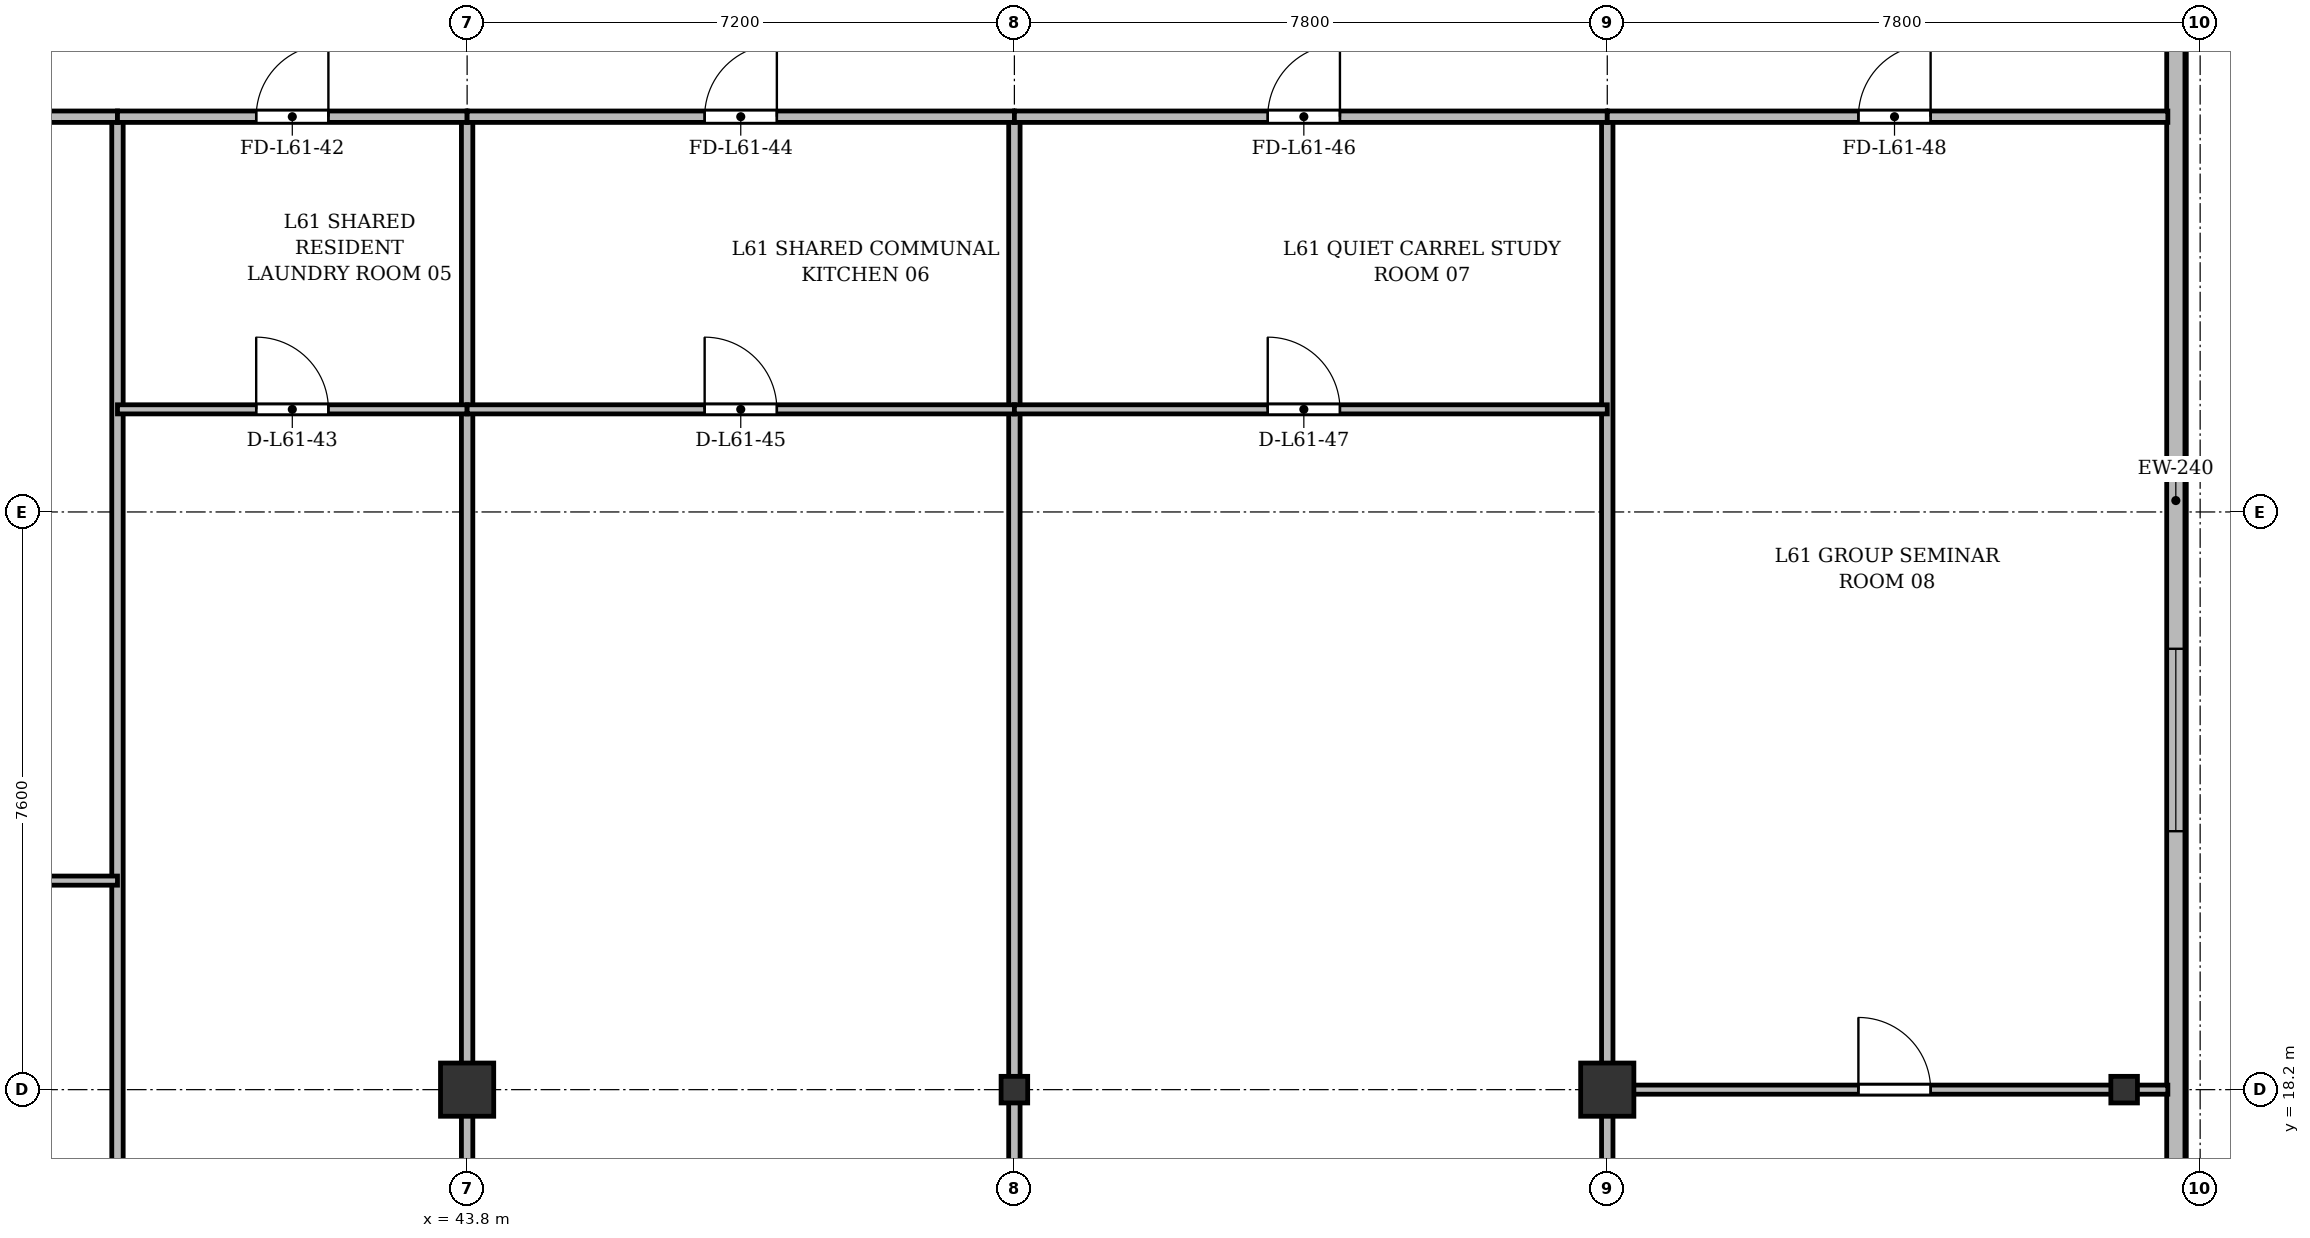
"""IFC4 building model, lengths in metres.
Left out: names, types, materials, properties, quantities, classifications, styles, units other than length and angle.
Written with IfcOpenShell. Run it as: python <this file> out.ifc"""

import sys

from ifc_helpers import new_model, si_unit, direction, frame, frame_2d, origin, origin_2d, place, context, subcontext, project, spatial, rectangle, i_section, extrude, source, transform, mapped, element, fill, save


model = new_model("IFC4")
c1 = context("Model", 3, precision=1e-05, world=origin(), true_north=direction((0.0, 1.0)))
c2 = subcontext(c1, "Body", "Model", "MODEL_VIEW")
j1 = project(units=[si_unit("LENGTHUNIT", "METRE"), si_unit("PLANEANGLEUNIT", "RADIAN")], contexts=[c1])
p1 = place(None, origin())
s1 = spatial("IfcSite", under=j1, at=p1, CompositionType="ELEMENT")
p2 = place(p1, origin())
s2 = spatial("IfcBuilding", under=s1, at=p2, CompositionType="ELEMENT")
p3 = place(p2, frame((0.0, 0.0, 233.7)))
s3 = spatial("IfcBuildingStorey", under=s2, at=p3, CompositionType="ELEMENT", Elevation=233.7)
m1 = source(origin(), c2, "Body", "SweptSolid", [
    extrude(rectangle(XDim=0.7, YDim=0.7, at=origin_2d()), origin(), (0.0, 0.0, 1.0), 3.6),
])
p4 = place(p3, frame((43.8, 18.2, 0.0), z_axis=(0.0, 0.0, 1.0), x_axis=(1.0, 0.0, 0.0)))
e1 = element("IfcColumn", 1, at=p4, inside=s3, PredefinedType="COLUMN", context=c2, shape_type="MappedRepresentation", body=[
    mapped(m1, transform((0.0, 0.0, 0.0), x_axis=(1.0, 0.0, 0.0), y_axis=(0.0, 1.0, 0.0), z_axis=(0.0, 0.0, 1.0), scale=1.0)),
])
m2 = source(origin(), c2, "Body", "SweptSolid", [
    extrude(i_section(OverallWidth=0.35, OverallDepth=0.35, WebThickness=0.018, FlangeThickness=0.028, at=origin_2d()), origin(), (0.0, 0.0, 1.0), 3.6),
])
p5 = place(p3, frame((51.0, 18.2, 0.0), z_axis=(0.0, 0.0, 1.0), x_axis=(1.0, 0.0, 0.0)))
e2 = element("IfcColumn", 2, at=p5, inside=s3, PredefinedType="COLUMN", context=c2, shape_type="MappedRepresentation", body=[
    mapped(m2, transform((0.0, 0.0, 0.0), x_axis=(1.0, 0.0, 0.0), y_axis=(0.0, 1.0, 0.0), z_axis=(0.0, 0.0, 1.0), scale=1.0)),
])
p6 = place(p3, frame((58.8, 18.2, 0.0), z_axis=(0.0, 0.0, 1.0), x_axis=(1.0, 0.0, 0.0)))
e3 = element("IfcColumn", 3, at=p6, inside=s3, PredefinedType="COLUMN", context=c2, shape_type="MappedRepresentation", body=[
    mapped(m1, transform((0.0, 0.0, 0.0), x_axis=(1.0, 0.0, 0.0), y_axis=(0.0, 1.0, 0.0), z_axis=(0.0, 0.0, 1.0), scale=1.0)),
])
p7 = place(p3, frame((65.6, 18.2, 0.0), z_axis=(0.0, 0.0, 1.0), x_axis=(1.0, 0.0, 0.0)))
e4 = element("IfcColumn", 4, at=p7, inside=s3, PredefinedType="COLUMN", context=c2, shape_type="MappedRepresentation", body=[
    mapped(m2, transform((0.0, 0.0, 0.0), x_axis=(1.0, 0.0, 0.0), y_axis=(0.0, 1.0, 0.0), z_axis=(0.0, 0.0, 1.0), scale=1.0)),
])
p8 = place(p3, frame((66.28, 45.5, 0.0), z_axis=(0.0, 0.0, 1.0), x_axis=(0.0, -1.0, 0.0)))
e5 = element("IfcWall", 5, at=p8, inside=s3, PredefinedType="SOLIDWALL", context=c2, shape_type="SweptSolid", body=[
    extrude(rectangle(XDim=39.1, YDim=0.24, at=frame_2d((19.55, 0.0))), origin(), (0.0, 0.0, 1.0), 3.36),
])
p9 = place(p8, frame((36.45, 0.0, 0.92)))
e6 = element("IfcOpeningElement", 6, at=p9, cuts=e5, PredefinedType="OPENING", context=c2, shape_type="SweptSolid", body=[
    extrude(rectangle(XDim=1.2, YDim=1.65, at=frame_2d((0.6, 0.825))), frame((0.0, 0.13, 0.0), z_axis=(0.0, -1.0, 0.0), x_axis=(1.0, 0.0, 0.0)), (0.0, 0.0, 1.0), 0.26),
])
p10 = place(p8, frame((32.9, 0.0, 0.92)))
e7 = element("IfcOpeningElement", 7, at=p10, cuts=e5, PredefinedType="OPENING", context=c2, shape_type="SweptSolid", body=[
    extrude(rectangle(XDim=2.4, YDim=2.1, at=frame_2d((1.2, 1.05))), frame((0.0, 0.13, 0.0), z_axis=(0.0, -1.0, 0.0), x_axis=(1.0, 0.0, 0.0)), (0.0, 0.0, 1.0), 0.26),
])
p11 = place(p8, frame((28.7, 0.0, 0.92)))
e8 = element("IfcOpeningElement", 8, at=p11, cuts=e5, PredefinedType="OPENING", context=c2, shape_type="SweptSolid", body=[
    extrude(rectangle(XDim=2.4, YDim=2.1, at=frame_2d((1.2, 1.05))), frame((0.0, 0.13, 0.0), z_axis=(0.0, -1.0, 0.0), x_axis=(1.0, 0.0, 0.0)), (0.0, 0.0, 1.0), 0.26),
])
p12 = place(p8, frame((21.5, 0.0, 0.92)))
e9 = element("IfcOpeningElement", 9, at=p12, cuts=e5, PredefinedType="OPENING", context=c2, shape_type="SweptSolid", body=[
    extrude(rectangle(XDim=2.4, YDim=2.1, at=frame_2d((1.2, 1.05))), frame((0.0, 0.13, 0.0), z_axis=(0.0, -1.0, 0.0), x_axis=(1.0, 0.0, 0.0)), (0.0, 0.0, 1.0), 0.26),
])
p13 = place(p8, frame((7.5, 0.0, 0.92)))
e10 = element("IfcOpeningElement", 10, at=p13, cuts=e5, PredefinedType="OPENING", context=c2, shape_type="SweptSolid", body=[
    extrude(rectangle(XDim=2.4, YDim=2.1, at=frame_2d((1.2, 1.05))), frame((0.0, 0.13, 0.0), z_axis=(0.0, -1.0, 0.0), x_axis=(1.0, 0.0, 0.0)), (0.0, 0.0, 1.0), 0.26),
])
p14 = place(p8, frame((4.5, 0.0, 0.92)))
e11 = element("IfcOpeningElement", 11, at=p14, cuts=e5, PredefinedType="OPENING", context=c2, shape_type="SweptSolid", body=[
    extrude(rectangle(XDim=1.2, YDim=1.65, at=frame_2d((0.6, 0.825))), frame((0.0, 0.13, 0.0), z_axis=(0.0, -1.0, 0.0), x_axis=(1.0, 0.0, 0.0)), (0.0, 0.0, 1.0), 0.26),
])
p15 = place(p8, frame((1.15, 0.0, 0.92)))
e12 = element("IfcOpeningElement", 12, at=p15, cuts=e5, PredefinedType="OPENING", context=c2, shape_type="SweptSolid", body=[
    extrude(rectangle(XDim=1.2, YDim=1.65, at=frame_2d((0.6, 0.825))), frame((0.0, 0.13, 0.0), z_axis=(0.0, -1.0, 0.0), x_axis=(1.0, 0.0, 0.0)), (0.0, 0.0, 1.0), 0.26),
])
p16 = place(p3, frame((39.2, 3.625, 0.0), z_axis=(0.0, 0.0, 1.0), x_axis=(0.0, 1.0, 0.0)))
e13 = element("IfcWall", 13, at=p16, inside=s3, PredefinedType="PARTITIONING", context=c2, shape_type="SweptSolid", body=[
    extrude(rectangle(XDim=27.375, YDim=0.15, at=frame_2d((13.688, 0.0))), origin(), (0.0, 0.0, 1.0), 2.91),
])
p17 = place(p3, frame((43.8, 3.625, 0.0), z_axis=(0.0, 0.0, 1.0), x_axis=(0.0, 1.0, 0.0)))
e14 = element("IfcWall", 14, at=p17, inside=s3, PredefinedType="PARTITIONING", context=c2, shape_type="SweptSolid", body=[
    extrude(rectangle(XDim=27.375, YDim=0.15, at=frame_2d((13.688, 0.0))), origin(), (0.0, 0.0, 1.0), 2.86),
])
p18 = place(p3, frame((51.0, 6.91, 0.0), z_axis=(0.0, 0.0, 1.0), x_axis=(0.0, 1.0, 0.0)))
e15 = element("IfcWall", 15, at=p18, inside=s3, PredefinedType="PARTITIONING", context=c2, shape_type="SweptSolid", body=[
    extrude(rectangle(XDim=24.09, YDim=0.15, at=frame_2d((12.045, 0.0))), origin(), (0.0, 0.0, 1.0), 2.86),
])
p19 = place(p3, frame((58.8, 3.625, 0.0), z_axis=(0.0, 0.0, 1.0), x_axis=(0.0, 1.0, 0.0)))
e16 = element("IfcWall", 16, at=p19, inside=s3, PredefinedType="PARTITIONING", context=c2, shape_type="SweptSolid", body=[
    extrude(rectangle(XDim=27.375, YDim=0.15, at=frame_2d((13.688, 0.0))), origin(), (0.0, 0.0, 1.0), 2.86),
])
p20 = place(p3, frame((30.6, 20.95, 0.0), z_axis=(0.0, 0.0, 1.0), x_axis=(1.0, 0.0, 0.0)))
e17 = element("IfcWall", 17, at=p20, inside=s3, PredefinedType="PARTITIONING", context=c2, shape_type="SweptSolid", body=[
    extrude(rectangle(XDim=8.6, YDim=0.12, at=frame_2d((4.3, 0.0))), origin(), (0.0, 0.0, 1.0), 2.86),
])
p21 = place(p20, frame((3.825, 0.0, 0.0)))
e18 = element("IfcOpeningElement", 18, at=p21, cuts=e17, PredefinedType="OPENING", context=c2, shape_type="SweptSolid", body=[
    extrude(rectangle(XDim=0.95, YDim=2.15, at=frame_2d((0.475, 1.075))), frame((0.0, 0.07, 0.0), z_axis=(0.0, -1.0, 0.0), x_axis=(1.0, 0.0, 0.0)), (0.0, 0.0, 1.0), 0.14),
])
p22 = place(p3, frame((30.6, 31.0, 0.0), z_axis=(0.0, 0.0, 1.0), x_axis=(1.0, 0.0, 0.0)))
e19 = element("IfcWall", 19, at=p22, inside=s3, PredefinedType="PARTITIONING", context=c2, shape_type="SweptSolid", body=[
    extrude(rectangle(XDim=8.6, YDim=0.15, at=frame_2d((4.3, 0.0))), origin(), (0.0, 0.0, 1.0), 2.86),
])
p23 = place(p22, frame((5.767, 0.0, 0.0)))
e20 = element("IfcOpeningElement", 20, at=p23, cuts=e19, PredefinedType="OPENING", context=c2, shape_type="SweptSolid", body=[
    extrude(rectangle(XDim=0.95, YDim=2.15, at=frame_2d((0.475, 1.075))), frame((0.0, 0.085, 0.0), z_axis=(0.0, -1.0, 0.0), x_axis=(1.0, 0.0, 0.0)), (0.0, 0.0, 1.0), 0.17),
])
p24 = place(p3, frame((39.2, 31.0, 0.0), z_axis=(0.0, 0.0, 1.0), x_axis=(1.0, 0.0, 0.0)))
e21 = element("IfcWall", 21, at=p24, inside=s3, PredefinedType="PARTITIONING", context=c2, shape_type="SweptSolid", body=[
    extrude(rectangle(XDim=4.6, YDim=0.15, at=frame_2d((2.3, 0.0))), origin(), (0.0, 0.0, 1.0), 2.86),
])
p25 = place(p24, frame((1.825, 0.0, 0.0)))
e22 = element("IfcOpeningElement", 22, at=p25, cuts=e21, PredefinedType="OPENING", context=c2, shape_type="SweptSolid", body=[
    extrude(rectangle(XDim=0.95, YDim=2.15, at=frame_2d((0.475, 1.075))), frame((0.0, 0.085, 0.0), z_axis=(0.0, -1.0, 0.0), x_axis=(1.0, 0.0, 0.0)), (0.0, 0.0, 1.0), 0.17),
])
p26 = place(p3, frame((39.2, 27.15, 0.0), z_axis=(0.0, 0.0, 1.0), x_axis=(1.0, 0.0, 0.0)))
e23 = element("IfcWall", 23, at=p26, inside=s3, PredefinedType="PARTITIONING", context=c2, shape_type="SweptSolid", body=[
    extrude(rectangle(XDim=4.6, YDim=0.12, at=frame_2d((2.3, 0.0))), origin(), (0.0, 0.0, 1.0), 2.86),
])
p27 = place(p26, frame((1.825, 0.0, 0.0)))
e24 = element("IfcOpeningElement", 24, at=p27, cuts=e23, PredefinedType="OPENING", context=c2, shape_type="SweptSolid", body=[
    extrude(rectangle(XDim=0.95, YDim=2.15, at=frame_2d((0.475, 1.075))), frame((0.0, 0.07, 0.0), z_axis=(0.0, -1.0, 0.0), x_axis=(1.0, 0.0, 0.0)), (0.0, 0.0, 1.0), 0.14),
])
p28 = place(p3, frame((43.8, 31.0, 0.0), z_axis=(0.0, 0.0, 1.0), x_axis=(1.0, 0.0, 0.0)))
e25 = element("IfcWall", 25, at=p28, inside=s3, PredefinedType="PARTITIONING", context=c2, shape_type="SweptSolid", body=[
    extrude(rectangle(XDim=7.2, YDim=0.15, at=frame_2d((3.6, 0.0))), origin(), (0.0, 0.0, 1.0), 2.86),
])
p29 = place(p28, frame((3.125, 0.0, 0.0)))
e26 = element("IfcOpeningElement", 26, at=p29, cuts=e25, PredefinedType="OPENING", context=c2, shape_type="SweptSolid", body=[
    extrude(rectangle(XDim=0.95, YDim=2.15, at=frame_2d((0.475, 1.075))), frame((0.0, 0.085, 0.0), z_axis=(0.0, -1.0, 0.0), x_axis=(1.0, 0.0, 0.0)), (0.0, 0.0, 1.0), 0.17),
])
p30 = place(p3, frame((43.8, 27.15, 0.0), z_axis=(0.0, 0.0, 1.0), x_axis=(1.0, 0.0, 0.0)))
e27 = element("IfcWall", 27, at=p30, inside=s3, PredefinedType="PARTITIONING", context=c2, shape_type="SweptSolid", body=[
    extrude(rectangle(XDim=7.2, YDim=0.12, at=frame_2d((3.6, 0.0))), origin(), (0.0, 0.0, 1.0), 2.86),
])
p31 = place(p30, frame((3.125, 0.0, 0.0)))
e28 = element("IfcOpeningElement", 28, at=p31, cuts=e27, PredefinedType="OPENING", context=c2, shape_type="SweptSolid", body=[
    extrude(rectangle(XDim=0.95, YDim=2.15, at=frame_2d((0.475, 1.075))), frame((0.0, 0.07, 0.0), z_axis=(0.0, -1.0, 0.0), x_axis=(1.0, 0.0, 0.0)), (0.0, 0.0, 1.0), 0.14),
])
p32 = place(p3, frame((51.0, 31.0, 0.0), z_axis=(0.0, 0.0, 1.0), x_axis=(1.0, 0.0, 0.0)))
e29 = element("IfcWall", 29, at=p32, inside=s3, PredefinedType="PARTITIONING", context=c2, shape_type="SweptSolid", body=[
    extrude(rectangle(XDim=7.8, YDim=0.15, at=frame_2d((3.9, 0.0))), origin(), (0.0, 0.0, 1.0), 2.86),
])
p33 = place(p32, frame((3.333, 0.0, 0.0)))
e30 = element("IfcOpeningElement", 30, at=p33, cuts=e29, PredefinedType="OPENING", context=c2, shape_type="SweptSolid", body=[
    extrude(rectangle(XDim=0.95, YDim=2.15, at=frame_2d((0.475, 1.075))), frame((0.0, 0.085, 0.0), z_axis=(0.0, -1.0, 0.0), x_axis=(1.0, 0.0, 0.0)), (0.0, 0.0, 1.0), 0.17),
])
p34 = place(p3, frame((51.0, 27.15, 0.0), z_axis=(0.0, 0.0, 1.0), x_axis=(1.0, 0.0, 0.0)))
e31 = element("IfcWall", 31, at=p34, inside=s3, PredefinedType="PARTITIONING", context=c2, shape_type="SweptSolid", body=[
    extrude(rectangle(XDim=7.8, YDim=0.12, at=frame_2d((3.9, 0.0))), origin(), (0.0, 0.0, 1.0), 2.86),
])
p35 = place(p34, frame((3.333, 0.0, 0.0)))
e32 = element("IfcOpeningElement", 32, at=p35, cuts=e31, PredefinedType="OPENING", context=c2, shape_type="SweptSolid", body=[
    extrude(rectangle(XDim=0.95, YDim=2.15, at=frame_2d((0.475, 1.075))), frame((0.0, 0.07, 0.0), z_axis=(0.0, -1.0, 0.0), x_axis=(1.0, 0.0, 0.0)), (0.0, 0.0, 1.0), 0.14),
])
p36 = place(p3, frame((58.8, 31.0, 0.0), z_axis=(0.0, 0.0, 1.0), x_axis=(1.0, 0.0, 0.0)))
e33 = element("IfcWall", 33, at=p36, inside=s3, PredefinedType="PARTITIONING", context=c2, shape_type="SweptSolid", body=[
    extrude(rectangle(XDim=7.375, YDim=0.15, at=frame_2d((3.688, 0.0))), origin(), (0.0, 0.0, 1.0), 2.86),
])
p37 = place(p36, frame((3.304, 0.0, 0.0)))
e34 = element("IfcOpeningElement", 34, at=p37, cuts=e33, PredefinedType="OPENING", context=c2, shape_type="SweptSolid", body=[
    extrude(rectangle(XDim=0.95, YDim=2.15, at=frame_2d((0.475, 1.075))), frame((0.0, 0.085, 0.0), z_axis=(0.0, -1.0, 0.0), x_axis=(1.0, 0.0, 0.0)), (0.0, 0.0, 1.0), 0.17),
])
p38 = place(p3, frame((58.8, 18.2, 0.0), z_axis=(0.0, 0.0, 1.0), x_axis=(1.0, 0.0, 0.0)))
e35 = element("IfcWall", 35, at=p38, inside=s3, PredefinedType="PARTITIONING", context=c2, shape_type="SweptSolid", body=[
    extrude(rectangle(XDim=7.375, YDim=0.12, at=frame_2d((3.688, 0.0))), origin(), (0.0, 0.0, 1.0), 2.91),
])
p39 = place(p38, frame((3.304, 0.0, 0.0)))
e36 = element("IfcOpeningElement", 36, at=p39, cuts=e35, PredefinedType="OPENING", context=c2, shape_type="SweptSolid", body=[
    extrude(rectangle(XDim=0.95, YDim=2.15, at=frame_2d((0.475, 1.075))), frame((0.0, 0.07, 0.0), z_axis=(0.0, -1.0, 0.0), x_axis=(1.0, 0.0, 0.0)), (0.0, 0.0, 1.0), 0.14),
])
m3 = source(origin(), c2, "Body", "SweptSolid", [
    extrude(rectangle(XDim=2.4, YDim=2.1, at=frame_2d((1.2, 1.05))), frame((0.0, 0.03, 0.0), z_axis=(0.0, -1.0, 0.0), x_axis=(1.0, 0.0, 0.0)), (0.0, 0.0, 1.0), 0.06),
])
p40 = place(p12, origin())
e37 = element("IfcWindow", 37, at=p40, inside=s3, PartitioningType="SINGLE_PANEL", PredefinedType="WINDOW", context=c2, shape_type="MappedRepresentation", body=[
    mapped(m3, transform((0.0, 0.0, 0.0), x_axis=(1.0, 0.0, 0.0), y_axis=(0.0, 1.0, 0.0), z_axis=(0.0, 0.0, 1.0), scale=1.0)),
])
fill(e9, e37)
m4 = source(origin(), c2, "Body", "SweptSolid", [
    extrude(rectangle(XDim=0.95, YDim=2.15, at=frame_2d((0.475, 1.075))), frame((0.0, 0.025, 0.0), z_axis=(0.0, -1.0, 0.0), x_axis=(1.0, 0.0, 0.0)), (0.0, 0.0, 1.0), 0.05),
])
p41 = place(p25, origin())
e38 = element("IfcDoor", 38, at=p41, inside=s3, OperationType="SINGLE_SWING_RIGHT", PredefinedType="DOOR", context=c2, shape_type="MappedRepresentation", body=[
    mapped(m4, transform((0.0, 0.0, 0.0), x_axis=(1.0, 0.0, 0.0), y_axis=(0.0, 1.0, 0.0), z_axis=(0.0, 0.0, 1.0), scale=1.0)),
])
fill(e22, e38)
p42 = place(p27, origin())
e39 = element("IfcDoor", 39, at=p42, inside=s3, OperationType="SINGLE_SWING_LEFT", PredefinedType="DOOR", context=c2, shape_type="MappedRepresentation", body=[
    mapped(m4, transform((0.0, 0.0, 0.0), x_axis=(1.0, 0.0, 0.0), y_axis=(0.0, 1.0, 0.0), z_axis=(0.0, 0.0, 1.0), scale=1.0)),
])
fill(e24, e39)
p43 = place(p29, origin())
e40 = element("IfcDoor", 40, at=p43, inside=s3, OperationType="SINGLE_SWING_RIGHT", PredefinedType="DOOR", context=c2, shape_type="MappedRepresentation", body=[
    mapped(m4, transform((0.0, 0.0, 0.0), x_axis=(1.0, 0.0, 0.0), y_axis=(0.0, 1.0, 0.0), z_axis=(0.0, 0.0, 1.0), scale=1.0)),
])
fill(e26, e40)
p44 = place(p31, origin())
e41 = element("IfcDoor", 41, at=p44, inside=s3, OperationType="SINGLE_SWING_LEFT", PredefinedType="DOOR", context=c2, shape_type="MappedRepresentation", body=[
    mapped(m4, transform((0.0, 0.0, 0.0), x_axis=(1.0, 0.0, 0.0), y_axis=(0.0, 1.0, 0.0), z_axis=(0.0, 0.0, 1.0), scale=1.0)),
])
fill(e28, e41)
p45 = place(p33, origin())
e42 = element("IfcDoor", 42, at=p45, inside=s3, OperationType="SINGLE_SWING_RIGHT", PredefinedType="DOOR", context=c2, shape_type="MappedRepresentation", body=[
    mapped(m4, transform((0.0, 0.0, 0.0), x_axis=(1.0, 0.0, 0.0), y_axis=(0.0, 1.0, 0.0), z_axis=(0.0, 0.0, 1.0), scale=1.0)),
])
fill(e30, e42)
p46 = place(p35, origin())
e43 = element("IfcDoor", 43, at=p46, inside=s3, OperationType="SINGLE_SWING_LEFT", PredefinedType="DOOR", context=c2, shape_type="MappedRepresentation", body=[
    mapped(m4, transform((0.0, 0.0, 0.0), x_axis=(1.0, 0.0, 0.0), y_axis=(0.0, 1.0, 0.0), z_axis=(0.0, 0.0, 1.0), scale=1.0)),
])
fill(e32, e43)
p47 = place(p37, origin())
e44 = element("IfcDoor", 44, at=p47, inside=s3, OperationType="SINGLE_SWING_RIGHT", PredefinedType="DOOR", context=c2, shape_type="MappedRepresentation", body=[
    mapped(m4, transform((0.0, 0.0, 0.0), x_axis=(1.0, 0.0, 0.0), y_axis=(0.0, 1.0, 0.0), z_axis=(0.0, 0.0, 1.0), scale=1.0)),
])
fill(e34, e44)
p48 = place(p39, origin())
e45 = element("IfcDoor", 45, at=p48, inside=s3, OperationType="SINGLE_SWING_LEFT", PredefinedType="DOOR", context=c2, shape_type="MappedRepresentation", body=[
    mapped(m4, transform((0.0, 0.0, 0.0), x_axis=(1.0, 0.0, 0.0), y_axis=(0.0, 1.0, 0.0), z_axis=(0.0, 0.0, 1.0), scale=1.0)),
])
fill(e36, e45)
save(model, sys.argv[1])
